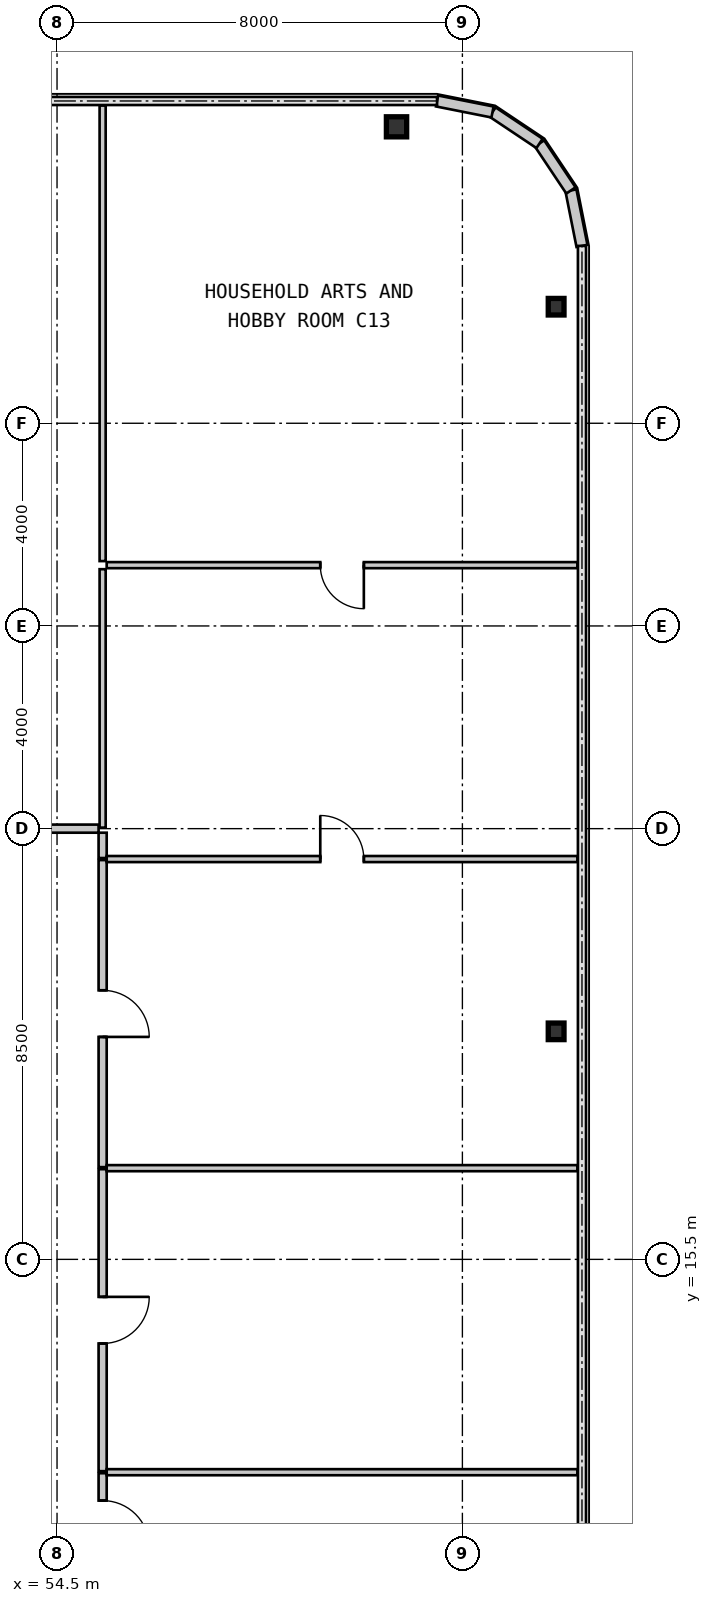
"""IFC4 building model, lengths in metres.
Left out: names, types, materials, properties, quantities, classifications, styles, units other than length and angle.
Written with IfcOpenShell. Run it as: python <this file> out.ifc"""

import sys

from ifc_helpers import new_model, si_unit, direction, frame, frame_2d, origin, origin_2d, place, context, subcontext, project, spatial, rectangle, i_section, extrude, source, transform, mapped, element, fill, save


model = new_model("IFC4")
c1 = context("Model", 3, precision=1e-05, world=origin(), true_north=direction((0.0, 1.0)))
c2 = subcontext(c1, "Body", "Model", "MODEL_VIEW")
j1 = project(units=[si_unit("LENGTHUNIT", "METRE"), si_unit("PLANEANGLEUNIT", "RADIAN")], contexts=[c1])
p1 = place(None, origin())
s1 = spatial("IfcSite", under=j1, at=p1, CompositionType="ELEMENT")
p2 = place(p1, origin())
s2 = spatial("IfcBuilding", under=s1, at=p2, CompositionType="ELEMENT")
p3 = place(p2, frame((0.0, 0.0, 26.25)))
s3 = spatial("IfcBuildingStorey", under=s2, at=p3, CompositionType="ELEMENT", Elevation=26.25)
m1 = source(origin(), c2, "Body", "SweptSolid", [
    extrude(i_section(OverallWidth=0.4, OverallDepth=0.396, WebThickness=0.022, FlangeThickness=0.034, at=origin_2d()), origin(), (0.0, 0.0, 1.0), 3.15),
])
p4 = place(p3, frame((61.2, 37.85, 0.0), z_axis=(0.0, 0.0, 1.0), x_axis=(1.0, 0.0, 0.0)))
e1 = element("IfcColumn", 1, at=p4, inside=s3, PredefinedType="COLUMN", context=c2, shape_type="MappedRepresentation", body=[
    mapped(m1, transform((0.0, 0.0, 0.0), scale=1.0)),
])
m2 = source(origin(), c2, "Body", "SweptSolid", [
    extrude(i_section(OverallWidth=0.311, OverallDepth=0.327, WebThickness=0.016, FlangeThickness=0.025, at=origin_2d()), origin(), (0.0, 0.0, 1.0), 3.15),
])
for number, where, z_axis, x_axis in (
    (2, (64.35, 20.0, 0.0), (0.0, 0.0, 1.0), (1.0, 0.0, 0.0)),
    (3, (64.35, 34.3, 0.0), (0.0, 0.0, 1.0), (1.0, 0.0, 0.0)),
):
    element("IfcColumn", number, at=place(p3, frame(where, z_axis=z_axis, x_axis=x_axis)), inside=s3, PredefinedType="COLUMN", context=c2, shape_type="MappedRepresentation", body=[
        mapped(m2, transform((0.0, 0.0, 0.0), scale=1.0)),
    ])
m3 = source(origin(), c2, "Body", "SweptSolid", [
    extrude(rectangle(XDim=1.116, YDim=0.22, at=frame_2d((0.558, 0.0))), origin(), (0.0, 0.0, 1.0), 2.93),
])
for number, where, z_axis, x_axis in (
    (4, (64.86, 35.5, 0.0), (0.0, 0.0, 1.0), (-0.195, 0.981, 0.0)),
    (5, (64.642, 36.594, 0.0), (0.0, 0.0, 1.0), (-0.556, 0.831, 0.0)),
    (6, (64.022, 37.522, 0.0), (0.0, 0.0, 1.0), (-0.831, 0.556, 0.0)),
    (7, (63.094, 38.142, 0.0), (0.0, 0.0, 1.0), (-0.981, 0.195, 0.0)),
):
    element("IfcWall", number, at=place(p3, frame(where, z_axis=z_axis, x_axis=x_axis)), inside=s3, PredefinedType="SOLIDWALL", context=c2, shape_type="MappedRepresentation", body=[
        mapped(m3, transform((0.0, 0.0, 0.0), scale=1.0)),
    ])
m4 = source(origin(), c2, "Body", "SweptSolid", [
    extrude(rectangle(XDim=2.0, YDim=0.16, at=frame_2d((1.0, 0.0))), origin(), (0.0, 0.0, 1.0), 2.93),
])
p5 = place(p3, frame((55.4, 11.28, 0.0), z_axis=(0.0, 0.0, 1.0), x_axis=(0.0, -1.0, 0.0)))
e8 = element("IfcWall", 8, at=p5, inside=s3, PredefinedType="PARTITIONING", context=c2, shape_type="MappedRepresentation", body=[
    mapped(m4, transform((0.0, 0.0, 0.0), scale=1.0)),
])
m5 = source(origin(), c2, "Body", "SweptSolid", [
    extrude(rectangle(XDim=0.92, YDim=2.1, at=frame_2d((0.46, 1.05))), frame((0.0, 0.09, 0.0), z_axis=(0.0, -1.0, 0.0), x_axis=(1.0, 0.0, 0.0)), (0.0, 0.0, 1.0), 0.18),
])
p6 = place(p5, frame((0.54, 0.0, 0.0)))
e9 = element("IfcOpeningElement", 9, at=p6, cuts=e8, PredefinedType="OPENING", context=c2, shape_type="MappedRepresentation", body=[
    mapped(m5, transform((0.0, 0.0, 0.0), scale=1.0)),
])
m6 = source(origin(), c2, "Body", "SweptSolid", [
    extrude(rectangle(XDim=5.959, YDim=0.16, at=frame_2d((2.98, 0.0))), origin(), (0.0, 0.0, 1.0), 2.93),
])
p7 = place(p3, frame((55.4, 17.28, 0.0), z_axis=(0.0, 0.0, 1.0), x_axis=(0.0, -1.0, 0.0)))
e10 = element("IfcWall", 10, at=p7, inside=s3, PredefinedType="PARTITIONING", context=c2, shape_type="MappedRepresentation", body=[
    mapped(m6, transform((0.0, 0.0, 0.0), scale=1.0)),
])
p8 = place(p7, frame((2.52, 0.0, 0.0)))
e11 = element("IfcOpeningElement", 11, at=p8, cuts=e10, PredefinedType="OPENING", context=c2, shape_type="MappedRepresentation", body=[
    mapped(m5, transform((0.0, 0.0, 0.0), scale=1.0)),
])
m7 = source(origin(), c2, "Body", "SweptSolid", [
    extrude(rectangle(XDim=6.06, YDim=0.16, at=frame_2d((3.03, 0.0))), origin(), (0.0, 0.0, 1.0), 2.93),
])
p9 = place(p3, frame((55.4, 23.38, 0.0), z_axis=(0.0, 0.0, 1.0), x_axis=(0.0, -1.0, 0.0)))
e12 = element("IfcWall", 12, at=p9, inside=s3, PredefinedType="PARTITIONING", context=c2, shape_type="MappedRepresentation", body=[
    mapped(m7, transform((0.0, 0.0, 0.0), scale=1.0)),
])
p10 = place(p9, frame((2.57, 0.0, 0.0)))
e13 = element("IfcOpeningElement", 13, at=p10, cuts=e12, PredefinedType="OPENING", context=c2, shape_type="MappedRepresentation", body=[
    mapped(m5, transform((0.0, 0.0, 0.0), scale=1.0)),
])
m8 = source(origin(), c2, "Body", "SweptSolid", [
    extrude(rectangle(XDim=0.5, YDim=0.16, at=frame_2d((0.25, 0.0))), origin(), (0.0, 0.0, 1.0), 2.93),
])
p11 = place(p3, frame((55.4, 23.92, 0.0), z_axis=(0.0, 0.0, 1.0), x_axis=(0.0, -1.0, 0.0)))
e14 = element("IfcWall", 14, at=p11, inside=s3, PredefinedType="PARTITIONING", context=c2, shape_type="MappedRepresentation", body=[
    mapped(m8, transform((0.0, 0.0, 0.0), scale=1.0)),
])
m9 = source(origin(), c2, "Body", "SweptSolid", [
    extrude(rectangle(XDim=4.13, YDim=0.16, at=frame_2d((2.065, 0.0))), origin(), (0.0, 0.0, 1.0), 2.93),
])
p12 = place(p3, frame((51.19, 24.0, 0.0), z_axis=(0.0, 0.0, 1.0), x_axis=(1.0, 0.0, 0.0)))
e15 = element("IfcWall", 15, at=p12, inside=s3, PredefinedType="PARTITIONING", context=c2, shape_type="MappedRepresentation", body=[
    mapped(m9, transform((0.0, 0.0, 0.0), scale=1.0)),
])
m10 = source(origin(), c2, "Body", "SweptSolid", [
    extrude(rectangle(XDim=9.29, YDim=0.12, at=frame_2d((4.645, 0.0))), origin(), (0.0, 0.0, 1.0), 2.93),
])
for number, where, z_axis, x_axis in (
    (16, (55.48, 11.3, 0.0), (0.0, 0.0, 1.0), (1.0, 0.0, 0.0)),
    (17, (55.48, 17.3, 0.0), (0.0, 0.0, 1.0), (1.0, 0.0, 0.0)),
):
    element("IfcWall", number, at=place(p3, frame(where, z_axis=z_axis, x_axis=x_axis)), inside=s3, PredefinedType="PARTITIONING", context=c2, shape_type="MappedRepresentation", body=[
        mapped(m10, transform((0.0, 0.0, 0.0), scale=1.0)),
    ])
p13 = place(p3, frame((55.48, 23.4, 0.0), z_axis=(0.0, 0.0, 1.0), x_axis=(1.0, 0.0, 0.0)))
e18 = element("IfcWall", 18, at=p13, inside=s3, PredefinedType="PARTITIONING", context=c2, shape_type="MappedRepresentation", body=[
    mapped(m10, transform((0.0, 0.0, 0.0), scale=1.0)),
])
m11 = source(origin(), c2, "Body", "SweptSolid", [
    extrude(rectangle(XDim=0.86, YDim=2.1, at=frame_2d((0.43, 1.05))), frame((0.0, 0.07, 0.0), z_axis=(0.0, -1.0, 0.0), x_axis=(1.0, 0.0, 0.0)), (0.0, 0.0, 1.0), 0.14),
])
p14 = place(p13, frame((4.215, 0.0, 0.0)))
e19 = element("IfcOpeningElement", 19, at=p14, cuts=e18, PredefinedType="OPENING", context=c2, shape_type="MappedRepresentation", body=[
    mapped(m11, transform((0.0, 0.0, 0.0), scale=1.0)),
])
p15 = place(p3, frame((55.48, 29.2, 0.0), z_axis=(0.0, 0.0, 1.0), x_axis=(1.0, 0.0, 0.0)))
e20 = element("IfcWall", 20, at=p15, inside=s3, PredefinedType="PARTITIONING", context=c2, shape_type="MappedRepresentation", body=[
    mapped(m10, transform((0.0, 0.0, 0.0), scale=1.0)),
])
p16 = place(p15, frame((4.215, 0.0, 0.0)))
e21 = element("IfcOpeningElement", 21, at=p16, cuts=e20, PredefinedType="OPENING", context=c2, shape_type="MappedRepresentation", body=[
    mapped(m11, transform((0.0, 0.0, 0.0), scale=1.0)),
])
m12 = source(origin(), c2, "Body", "SweptSolid", [
    extrude(rectangle(XDim=5.1, YDim=0.12, at=frame_2d((2.55, 0.0))), origin(), (0.0, 0.0, 1.0), 2.93),
])
p17 = place(p3, frame((55.4, 24.02, 0.0), z_axis=(0.0, 0.0, 1.0), x_axis=(0.0, 1.0, 0.0)))
e22 = element("IfcWall", 22, at=p17, inside=s3, PredefinedType="PARTITIONING", context=c2, shape_type="MappedRepresentation", body=[
    mapped(m12, transform((0.0, 0.0, 0.0), scale=1.0)),
])
m13 = source(origin(), c2, "Body", "SweptSolid", [
    extrude(rectangle(XDim=8.99, YDim=0.12, at=frame_2d((4.495, 0.0))), origin(), (0.0, 0.0, 1.0), 2.93),
])
p18 = place(p3, frame((55.4, 29.28, 0.0), z_axis=(0.0, 0.0, 1.0), x_axis=(0.0, 1.0, 0.0)))
e23 = element("IfcWall", 23, at=p18, inside=s3, PredefinedType="PARTITIONING", context=c2, shape_type="MappedRepresentation", body=[
    mapped(m13, transform((0.0, 0.0, 0.0), scale=1.0)),
])
m14 = source(origin(), c2, "Body", "SweptSolid", [
    extrude(rectangle(XDim=0.92, YDim=2.1, at=frame_2d((0.46, 1.05))), frame((0.0, 0.025, 0.0), z_axis=(0.0, -1.0, 0.0), x_axis=(1.0, 0.0, 0.0)), (0.0, 0.0, 1.0), 0.05),
])
p19 = place(p6, origin())
e24 = element("IfcDoor", 24, at=p19, inside=s3, OperationType="SINGLE_SWING_RIGHT", PredefinedType="DOOR", context=c2, shape_type="MappedRepresentation", body=[
    mapped(m14, transform((0.0, 0.0, 0.0), scale=1.0)),
])
fill(e9, e24)
p20 = place(p8, origin())
e25 = element("IfcDoor", 25, at=p20, inside=s3, OperationType="SINGLE_SWING_LEFT", PredefinedType="DOOR", context=c2, shape_type="MappedRepresentation", body=[
    mapped(m14, transform((0.0, 0.0, 0.0), scale=1.0)),
])
fill(e11, e25)
p21 = place(p10, origin())
e26 = element("IfcDoor", 26, at=p21, inside=s3, OperationType="SINGLE_SWING_RIGHT", PredefinedType="DOOR", context=c2, shape_type="MappedRepresentation", body=[
    mapped(m14, transform((0.0, 0.0, 0.0), scale=1.0)),
])
fill(e13, e26)
m15 = source(origin(), c2, "Body", "SweptSolid", [
    extrude(rectangle(XDim=0.86, YDim=2.1, at=frame_2d((0.43, 1.05))), frame((0.0, 0.025, 0.0), z_axis=(0.0, -1.0, 0.0), x_axis=(1.0, 0.0, 0.0)), (0.0, 0.0, 1.0), 0.05),
])
p22 = place(p14, origin())
e27 = element("IfcDoor", 27, at=p22, inside=s3, OperationType="SINGLE_SWING_LEFT", PredefinedType="DOOR", context=c2, shape_type="MappedRepresentation", body=[
    mapped(m15, transform((0.0, 0.0, 0.0), scale=1.0)),
])
fill(e19, e27)
p23 = place(p16, frame((0.86, 0.0, 0.0), z_axis=(0.0, 0.0, 1.0), x_axis=(-1.0, 0.0, 0.0)))
e28 = element("IfcDoor", 28, at=p23, inside=s3, OperationType="SINGLE_SWING_LEFT", PredefinedType="DOOR", context=c2, shape_type="MappedRepresentation", body=[
    mapped(m15, transform((0.0, 0.0, 0.0), scale=1.0)),
])
fill(e21, e28)
save(model, sys.argv[1])
